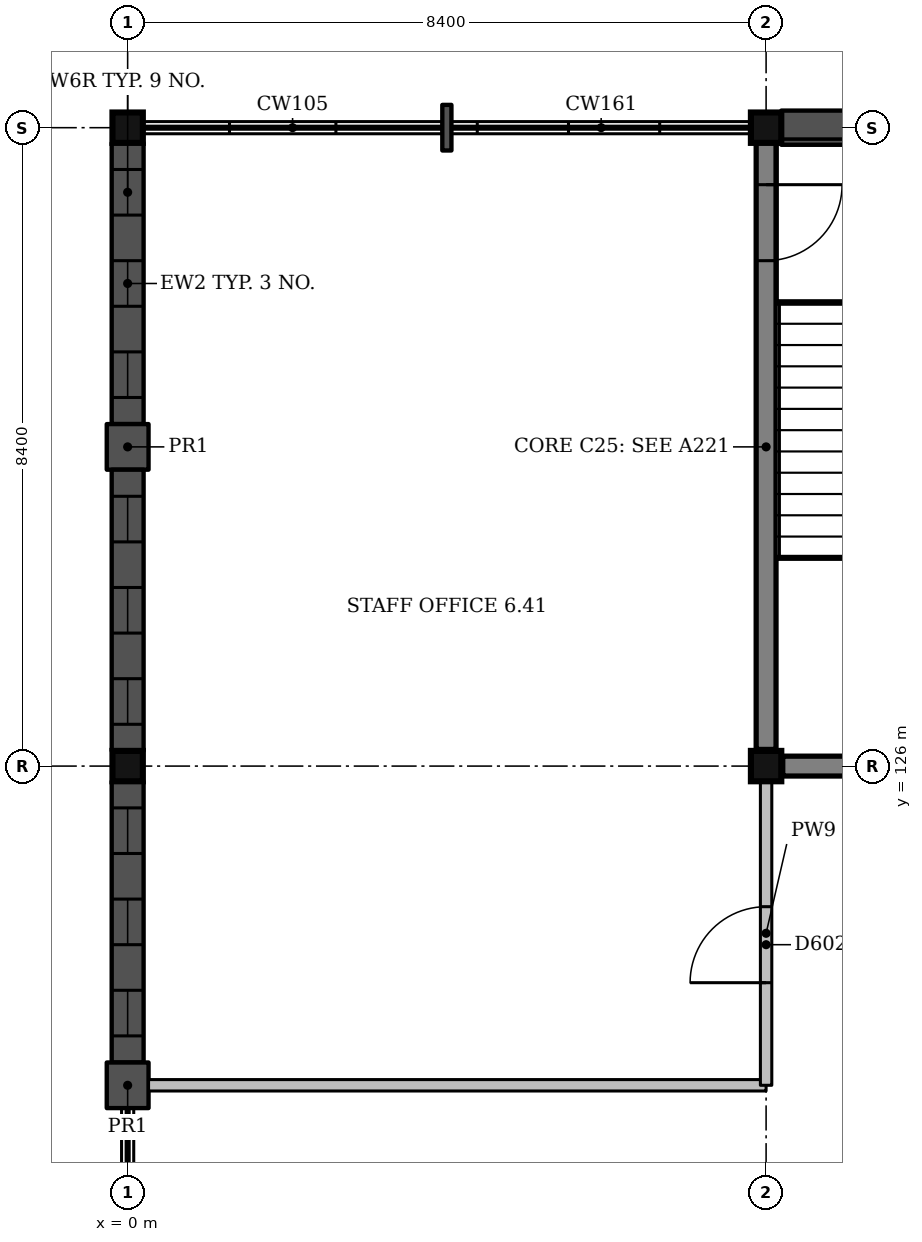
"""IFC4 building model, lengths in metres.
Left out: names, types, materials, properties, quantities, classifications, styles, units other than length and angle.
Written with IfcOpenShell. Run it as: python <this file> out.ifc"""

import sys

from ifc_helpers import new_model, si_unit, direction, frame, frame_2d, origin, origin_2d, place, context, subcontext, project, spatial, rectangle, extrude, element, fill, save


model = new_model("IFC4")
c1 = context("Model", 3, precision=1e-05, world=origin(), true_north=direction((0.0, 1.0)))
c2 = subcontext(c1, "Body", "Model", "MODEL_VIEW")
j1 = project(units=[si_unit("LENGTHUNIT", "METRE"), si_unit("PLANEANGLEUNIT", "RADIAN")], contexts=[c1])
p1 = place(None, origin())
s1 = spatial("IfcSite", under=j1, at=p1, CompositionType="ELEMENT")
p2 = place(p1, origin())
s2 = spatial("IfcBuilding", under=s1, at=p2, CompositionType="ELEMENT")
p3 = place(p2, frame((0.0, 0.0, 27.0)))
s3 = spatial("IfcBuildingStorey", under=s2, at=p3, CompositionType="ELEMENT", Elevation=27.0)
for number, where, z_axis, x_axis in (
    (1, (0.0, 126.0, 0.0), (0.0, 0.0, 1.0), (1.0, 0.0, 0.0)),
    (2, (0.0, 134.4, 0.0), (0.0, 0.0, 1.0), (1.0, 0.0, 0.0)),
    (3, (8.4, 126.0, 0.0), (0.0, 0.0, 1.0), (1.0, 0.0, 0.0)),
    (4, (8.4, 134.4, 0.0), (0.0, 0.0, 1.0), (1.0, 0.0, 0.0)),
):
    element("IfcColumn", number, at=place(p3, frame(where, z_axis=z_axis, x_axis=x_axis)), inside=s3, PredefinedType="COLUMN", context=c2, shape_type="SweptSolid", body=[
        extrude(rectangle(XDim=0.4, YDim=0.4, at=origin_2d()), origin(), (0.0, 0.0, 1.0), 4.5),
    ])
p4 = place(p3, frame((8.625, 126.0, 0.0), z_axis=(0.0, 0.0, 1.0), x_axis=(1.0, 0.0, 0.0)))
e5 = element("IfcWall", 5, at=p4, inside=s3, PredefinedType="SHEAR", context=c2, shape_type="SweptSolid", body=[
    extrude(rectangle(XDim=5.275, YDim=0.25, at=frame_2d((2.637, 0.0))), origin(), (0.0, 0.0, 1.0), 4.5),
])
p5 = place(p3, frame((8.4, 126.225, 0.0), z_axis=(0.0, 0.0, 1.0), x_axis=(0.0, 1.0, 0.0)))
e6 = element("IfcWall", 6, at=p5, inside=s3, PredefinedType="SHEAR", context=c2, shape_type="SweptSolid", body=[
    extrude(rectangle(XDim=7.975, YDim=0.25, at=frame_2d((3.987, 0.0))), origin(), (0.0, 0.0, 1.0), 4.5),
])
p6 = place(p5, frame((6.425, 0.0, 0.0)))
e7 = element("IfcOpeningElement", 7, at=p6, cuts=e6, PredefinedType="OPENING", context=c2, shape_type="SweptSolid", body=[
    extrude(rectangle(XDim=1.0, YDim=2.1, at=frame_2d((0.5, 1.05))), frame((0.0, 0.135, 0.0), z_axis=(0.0, -1.0, 0.0), x_axis=(1.0, 0.0, 0.0)), (0.0, 0.0, 1.0), 0.27),
])
p7 = place(p3, frame((11.207, 134.4, 0.0), z_axis=(0.0, 0.0, 1.0), x_axis=(-1.0, 0.0, 0.0)))
e8 = element("IfcWall", 8, at=p7, inside=s3, PredefinedType="SOLIDWALL", context=c2, shape_type="SweptSolid", body=[
    extrude(rectangle(XDim=2.607, YDim=0.45, at=frame_2d((1.303, 0.0))), origin(), (0.0, 0.0, 1.0), 3.35),
])
p8 = place(p3, frame((4.26, 134.4, 0.0), z_axis=(0.0, 0.0, 1.0), x_axis=(-1.0, 0.0, 0.0)))
e9 = element("IfcWall", 9, at=p8, inside=s3, PredefinedType="SOLIDWALL", context=c2, shape_type="SweptSolid", body=[
    extrude(rectangle(XDim=0.12, YDim=0.6, at=frame_2d((0.06, 0.0))), origin(), (0.0, 0.0, 1.0), 3.35),
])
p9 = place(p3, frame((0.0, 134.2, 0.0), z_axis=(0.0, 0.0, 1.0), x_axis=(0.0, -1.0, 0.0)))
e10 = element("IfcWall", 10, at=p9, inside=s3, PredefinedType="SOLIDWALL", context=c2, shape_type="SweptSolid", body=[
    extrude(rectangle(XDim=3.7, YDim=0.42, at=frame_2d((1.85, 0.0))), origin(), (0.0, 0.0, 1.0), 3.35),
])
p10 = place(p9, frame((0.35, 0.0, 1.0)))
e11 = element("IfcOpeningElement", 11, at=p10, cuts=e10, PredefinedType="OPENING", context=c2, shape_type="SweptSolid", body=[
    extrude(rectangle(XDim=0.6, YDim=1.8, at=frame_2d((0.3, 0.9))), frame((0.0, 0.22, 0.0), z_axis=(0.0, -1.0, 0.0), x_axis=(1.0, 0.0, 0.0)), (0.0, 0.0, 1.0), 0.44),
])
p11 = place(p9, frame((1.55, 0.0, 1.0)))
e12 = element("IfcOpeningElement", 12, at=p11, cuts=e10, PredefinedType="OPENING", context=c2, shape_type="SweptSolid", body=[
    extrude(rectangle(XDim=0.6, YDim=1.8, at=frame_2d((0.3, 0.9))), frame((0.0, 0.22, 0.0), z_axis=(0.0, -1.0, 0.0), x_axis=(1.0, 0.0, 0.0)), (0.0, 0.0, 1.0), 0.44),
])
p12 = place(p9, frame((2.75, 0.0, 1.0)))
e13 = element("IfcOpeningElement", 13, at=p12, cuts=e10, PredefinedType="OPENING", context=c2, shape_type="SweptSolid", body=[
    extrude(rectangle(XDim=0.6, YDim=1.8, at=frame_2d((0.3, 0.9))), frame((0.0, 0.22, 0.0), z_axis=(0.0, -1.0, 0.0), x_axis=(1.0, 0.0, 0.0)), (0.0, 0.0, 1.0), 0.44),
])
p13 = place(p3, frame((0.0, 130.5, 0.0), z_axis=(0.0, 0.0, 1.0), x_axis=(0.0, -1.0, 0.0)))
e14 = element("IfcWall", 14, at=p13, inside=s3, PredefinedType="SOLIDWALL", context=c2, shape_type="SweptSolid", body=[
    extrude(rectangle(XDim=0.6, YDim=0.55, at=frame_2d((0.3, 0.0))), origin(), (0.0, 0.0, 1.0), 3.35),
])
p14 = place(p3, frame((0.0, 129.9, 0.0), z_axis=(0.0, 0.0, 1.0), x_axis=(0.0, -1.0, 0.0)))
e15 = element("IfcWall", 15, at=p14, inside=s3, PredefinedType="SOLIDWALL", context=c2, shape_type="SweptSolid", body=[
    extrude(rectangle(XDim=3.7, YDim=0.42, at=frame_2d((1.85, 0.0))), origin(), (0.0, 0.0, 1.0), 3.35),
])
p15 = place(p14, frame((0.35, 0.0, 1.0)))
e16 = element("IfcOpeningElement", 16, at=p15, cuts=e15, PredefinedType="OPENING", context=c2, shape_type="SweptSolid", body=[
    extrude(rectangle(XDim=0.6, YDim=1.8, at=frame_2d((0.3, 0.9))), frame((0.0, 0.22, 0.0), z_axis=(0.0, -1.0, 0.0), x_axis=(1.0, 0.0, 0.0)), (0.0, 0.0, 1.0), 0.44),
])
p16 = place(p14, frame((1.55, 0.0, 1.0)))
e17 = element("IfcOpeningElement", 17, at=p16, cuts=e15, PredefinedType="OPENING", context=c2, shape_type="SweptSolid", body=[
    extrude(rectangle(XDim=0.6, YDim=1.8, at=frame_2d((0.3, 0.9))), frame((0.0, 0.22, 0.0), z_axis=(0.0, -1.0, 0.0), x_axis=(1.0, 0.0, 0.0)), (0.0, 0.0, 1.0), 0.44),
])
p17 = place(p14, frame((2.75, 0.0, 1.0)))
e18 = element("IfcOpeningElement", 18, at=p17, cuts=e15, PredefinedType="OPENING", context=c2, shape_type="SweptSolid", body=[
    extrude(rectangle(XDim=0.6, YDim=1.8, at=frame_2d((0.3, 0.9))), frame((0.0, 0.22, 0.0), z_axis=(0.0, -1.0, 0.0), x_axis=(1.0, 0.0, 0.0)), (0.0, 0.0, 1.0), 0.44),
])
p18 = place(p3, frame((0.0, 125.8, 0.0), z_axis=(0.0, 0.0, 1.0), x_axis=(0.0, -1.0, 0.0)))
e19 = element("IfcWall", 19, at=p18, inside=s3, PredefinedType="SOLIDWALL", context=c2, shape_type="SweptSolid", body=[
    extrude(rectangle(XDim=3.7, YDim=0.42, at=frame_2d((1.85, 0.0))), origin(), (0.0, 0.0, 1.0), 3.35),
])
p19 = place(p18, frame((0.35, 0.0, 1.0)))
e20 = element("IfcOpeningElement", 20, at=p19, cuts=e19, PredefinedType="OPENING", context=c2, shape_type="SweptSolid", body=[
    extrude(rectangle(XDim=0.6, YDim=1.8, at=frame_2d((0.3, 0.9))), frame((0.0, 0.22, 0.0), z_axis=(0.0, -1.0, 0.0), x_axis=(1.0, 0.0, 0.0)), (0.0, 0.0, 1.0), 0.44),
])
p20 = place(p18, frame((1.55, 0.0, 1.0)))
e21 = element("IfcOpeningElement", 21, at=p20, cuts=e19, PredefinedType="OPENING", context=c2, shape_type="SweptSolid", body=[
    extrude(rectangle(XDim=0.6, YDim=1.8, at=frame_2d((0.3, 0.9))), frame((0.0, 0.22, 0.0), z_axis=(0.0, -1.0, 0.0), x_axis=(1.0, 0.0, 0.0)), (0.0, 0.0, 1.0), 0.44),
])
p21 = place(p18, frame((2.75, 0.0, 1.0)))
e22 = element("IfcOpeningElement", 22, at=p21, cuts=e19, PredefinedType="OPENING", context=c2, shape_type="SweptSolid", body=[
    extrude(rectangle(XDim=0.6, YDim=1.8, at=frame_2d((0.3, 0.9))), frame((0.0, 0.22, 0.0), z_axis=(0.0, -1.0, 0.0), x_axis=(1.0, 0.0, 0.0)), (0.0, 0.0, 1.0), 0.44),
])
p22 = place(p3, frame((0.0, 122.1, 0.0), z_axis=(0.0, 0.0, 1.0), x_axis=(0.0, -1.0, 0.0)))
e23 = element("IfcWall", 23, at=p22, inside=s3, PredefinedType="SOLIDWALL", context=c2, shape_type="SweptSolid", body=[
    extrude(rectangle(XDim=0.6, YDim=0.55, at=frame_2d((0.3, 0.0))), origin(), (0.0, 0.0, 1.0), 3.35),
])
p23 = place(p3, frame((0.275, 121.8, 0.0), z_axis=(0.0, 0.0, 1.0), x_axis=(1.0, 0.0, 0.0)))
e24 = element("IfcWall", 24, at=p23, inside=s3, PredefinedType="PARTITIONING", context=c2, shape_type="SweptSolid", body=[
    extrude(rectangle(XDim=8.125, YDim=0.15, at=frame_2d((4.062, 0.0))), origin(), (0.0, 0.0, 1.0), 3.4),
])
p24 = place(p3, frame((8.4, 121.8, 0.0), z_axis=(0.0, 0.0, 1.0), x_axis=(0.0, 1.0, 0.0)))
e25 = element("IfcWall", 25, at=p24, inside=s3, PredefinedType="PARTITIONING", context=c2, shape_type="SweptSolid", body=[
    extrude(rectangle(XDim=4.0, YDim=0.15, at=frame_2d((2.0, 0.0))), origin(), (0.0, 0.0, 1.0), 3.4),
])
p25 = place(p24, frame((1.35, 0.0, 0.0)))
e26 = element("IfcOpeningElement", 26, at=p25, cuts=e25, PredefinedType="OPENING", context=c2, shape_type="SweptSolid", body=[
    extrude(rectangle(XDim=1.0, YDim=2.1, at=frame_2d((0.5, 1.05))), frame((0.0, 0.085, 0.0), z_axis=(0.0, -1.0, 0.0), x_axis=(1.0, 0.0, 0.0)), (0.0, 0.0, 1.0), 0.17),
])
p26 = place(p10, origin())
e27 = element("IfcWindow", 27, at=p26, inside=s3, PartitioningType="SINGLE_PANEL", PredefinedType="WINDOW", context=c2, shape_type="SweptSolid", body=[
    extrude(rectangle(XDim=0.6, YDim=1.8, at=frame_2d((0.3, 0.9))), frame((0.0, 0.15, 0.0), z_axis=(0.0, -1.0, 0.0), x_axis=(1.0, 0.0, 0.0)), (0.0, 0.0, 1.0), 0.06),
])
fill(e11, e27)
p27 = place(p11, origin())
e28 = element("IfcWindow", 28, at=p27, inside=s3, PartitioningType="SINGLE_PANEL", PredefinedType="WINDOW", context=c2, shape_type="SweptSolid", body=[
    extrude(rectangle(XDim=0.6, YDim=1.8, at=frame_2d((0.3, 0.9))), frame((0.0, 0.15, 0.0), z_axis=(0.0, -1.0, 0.0), x_axis=(1.0, 0.0, 0.0)), (0.0, 0.0, 1.0), 0.06),
])
fill(e12, e28)
p28 = place(p12, origin())
e29 = element("IfcWindow", 29, at=p28, inside=s3, PartitioningType="SINGLE_PANEL", PredefinedType="WINDOW", context=c2, shape_type="SweptSolid", body=[
    extrude(rectangle(XDim=0.6, YDim=1.8, at=frame_2d((0.3, 0.9))), frame((0.0, 0.15, 0.0), z_axis=(0.0, -1.0, 0.0), x_axis=(1.0, 0.0, 0.0)), (0.0, 0.0, 1.0), 0.06),
])
fill(e13, e29)
p29 = place(p15, origin())
e30 = element("IfcWindow", 30, at=p29, inside=s3, PartitioningType="SINGLE_PANEL", PredefinedType="WINDOW", context=c2, shape_type="SweptSolid", body=[
    extrude(rectangle(XDim=0.6, YDim=1.8, at=frame_2d((0.3, 0.9))), frame((0.0, 0.15, 0.0), z_axis=(0.0, -1.0, 0.0), x_axis=(1.0, 0.0, 0.0)), (0.0, 0.0, 1.0), 0.06),
])
fill(e16, e30)
p30 = place(p16, origin())
e31 = element("IfcWindow", 31, at=p30, inside=s3, PartitioningType="SINGLE_PANEL", PredefinedType="WINDOW", context=c2, shape_type="SweptSolid", body=[
    extrude(rectangle(XDim=0.6, YDim=1.8, at=frame_2d((0.3, 0.9))), frame((0.0, 0.15, 0.0), z_axis=(0.0, -1.0, 0.0), x_axis=(1.0, 0.0, 0.0)), (0.0, 0.0, 1.0), 0.06),
])
fill(e17, e31)
p31 = place(p17, origin())
e32 = element("IfcWindow", 32, at=p31, inside=s3, PartitioningType="SINGLE_PANEL", PredefinedType="WINDOW", context=c2, shape_type="SweptSolid", body=[
    extrude(rectangle(XDim=0.6, YDim=1.8, at=frame_2d((0.3, 0.9))), frame((0.0, 0.15, 0.0), z_axis=(0.0, -1.0, 0.0), x_axis=(1.0, 0.0, 0.0)), (0.0, 0.0, 1.0), 0.06),
])
fill(e18, e32)
p32 = place(p19, origin())
e33 = element("IfcWindow", 33, at=p32, inside=s3, PartitioningType="SINGLE_PANEL", PredefinedType="WINDOW", context=c2, shape_type="SweptSolid", body=[
    extrude(rectangle(XDim=0.6, YDim=1.8, at=frame_2d((0.3, 0.9))), frame((0.0, 0.15, 0.0), z_axis=(0.0, -1.0, 0.0), x_axis=(1.0, 0.0, 0.0)), (0.0, 0.0, 1.0), 0.06),
])
fill(e20, e33)
p33 = place(p20, origin())
e34 = element("IfcWindow", 34, at=p33, inside=s3, PartitioningType="SINGLE_PANEL", PredefinedType="WINDOW", context=c2, shape_type="SweptSolid", body=[
    extrude(rectangle(XDim=0.6, YDim=1.8, at=frame_2d((0.3, 0.9))), frame((0.0, 0.15, 0.0), z_axis=(0.0, -1.0, 0.0), x_axis=(1.0, 0.0, 0.0)), (0.0, 0.0, 1.0), 0.06),
])
fill(e21, e34)
p34 = place(p21, origin())
e35 = element("IfcWindow", 35, at=p34, inside=s3, PartitioningType="SINGLE_PANEL", PredefinedType="WINDOW", context=c2, shape_type="SweptSolid", body=[
    extrude(rectangle(XDim=0.6, YDim=1.8, at=frame_2d((0.3, 0.9))), frame((0.0, 0.15, 0.0), z_axis=(0.0, -1.0, 0.0), x_axis=(1.0, 0.0, 0.0)), (0.0, 0.0, 1.0), 0.06),
])
fill(e22, e35)
p35 = place(p25, origin())
e36 = element("IfcDoor", 36, at=p35, inside=s3, OperationType="SINGLE_SWING_LEFT", PredefinedType="DOOR", context=c2, shape_type="SweptSolid", body=[
    extrude(rectangle(XDim=1.0, YDim=2.1, at=frame_2d((0.5, 1.05))), frame((0.0, 0.025, 0.0), z_axis=(0.0, -1.0, 0.0), x_axis=(1.0, 0.0, 0.0)), (0.0, 0.0, 1.0), 0.05),
])
fill(e26, e36)
p36 = place(p6, origin())
e37 = element("IfcDoor", 37, at=p36, inside=s3, OperationType="SINGLE_SWING_RIGHT", PredefinedType="DOOR", context=c2, shape_type="SweptSolid", body=[
    extrude(rectangle(XDim=1.0, YDim=2.1, at=frame_2d((0.5, 1.05))), frame((0.0, 0.025, 0.0), z_axis=(0.0, -1.0, 0.0), x_axis=(1.0, 0.0, 0.0)), (0.0, 0.0, 1.0), 0.05),
])
fill(e7, e37)
save(model, sys.argv[1])
